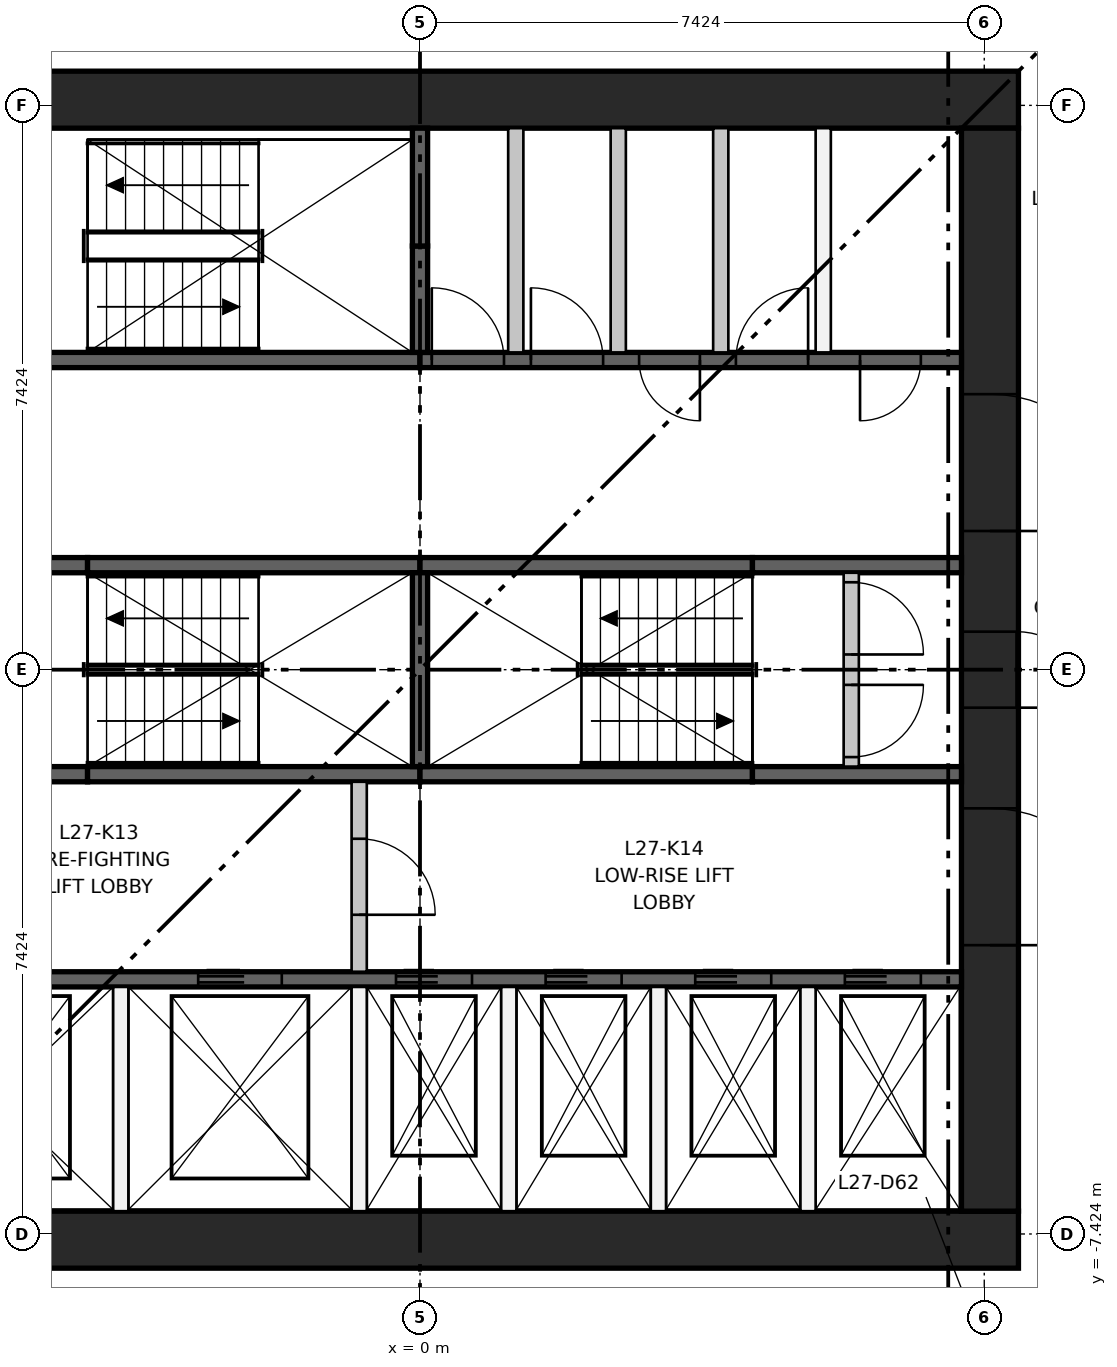
"""IFC4 building model, lengths in metres.
Left out: names, types, materials, properties, quantities, classifications, styles, units other than length and angle.
Written with IfcOpenShell. Run it as: python <this file> out.ifc"""

import sys

from ifc_helpers import new_model, si_unit, direction, frame, frame_2d, origin, place, context, subcontext, project, spatial, rectangle, extrude, element, fill, save


model = new_model("IFC4")
c1 = context("Model", 3, precision=1e-05, world=origin(), true_north=direction((0.0, 1.0)))
c2 = subcontext(c1, "Body", "Model", "MODEL_VIEW")
j1 = project(units=[si_unit("LENGTHUNIT", "METRE"), si_unit("PLANEANGLEUNIT", "RADIAN")], contexts=[c1])
p1 = place(None, origin())
s1 = spatial("IfcSite", under=j1, at=p1, CompositionType="ELEMENT")
p2 = place(p1, origin())
s2 = spatial("IfcBuilding", under=s1, at=p2, CompositionType="ELEMENT")
p3 = place(p2, frame((0.0, 0.0, 105.6)))
s3 = spatial("IfcBuildingStorey", under=s2, at=p3, CompositionType="ELEMENT", Elevation=105.6)
for number, where, z_axis, x_axis in (
    (1, (-7.874, -7.499, 0.0), (0.0, 0.0, 1.0), (1.0, 0.0, 0.0)),
    (2, (-7.874, 7.499, 0.0), (0.0, 0.0, 1.0), (1.0, 0.0, 0.0)),
):
    element("IfcWall", number, at=place(p3, frame(where, z_axis=z_axis, x_axis=x_axis)), inside=s3, PredefinedType="SHEAR", context=c2, shape_type="SweptSolid", body=[
        extrude(rectangle(XDim=15.748, YDim=0.75, at=frame_2d((7.874, 0.0))), origin(), (0.0, 0.0, 1.0), 3.65),
    ])
p4 = place(p3, frame((7.499, -7.124, 0.0), z_axis=(0.0, 0.0, 1.0), x_axis=(0.0, 1.0, 0.0)))
e3 = element("IfcWall", 3, at=p4, inside=s3, PredefinedType="SHEAR", context=c2, shape_type="SweptSolid", body=[
    extrude(rectangle(XDim=14.248, YDim=0.75, at=frame_2d((7.124, 0.0))), origin(), (0.0, 0.0, 1.0), 3.65),
])
p5 = place(p4, frame((6.624, 0.0, 0.0)))
e4 = element("IfcOpeningElement", 4, at=p5, cuts=e3, PredefinedType="OPENING", context=c2, shape_type="SweptSolid", body=[
    extrude(rectangle(XDim=1.0, YDim=2.1, at=frame_2d((0.5, 1.05))), frame((0.0, 0.385, 0.0), z_axis=(0.0, -1.0, 0.0), x_axis=(1.0, 0.0, 0.0)), (0.0, 0.0, 1.0), 0.77),
])
p6 = place(p4, frame((3.5, 0.0, 0.0)))
e5 = element("IfcOpeningElement", 5, at=p6, cuts=e3, PredefinedType="OPENING", context=c2, shape_type="SweptSolid", body=[
    extrude(rectangle(XDim=1.8, YDim=2.1, at=frame_2d((0.9, 1.05))), frame((0.0, 0.385, 0.0), z_axis=(0.0, -1.0, 0.0), x_axis=(1.0, 0.0, 0.0)), (0.0, 0.0, 1.0), 0.77),
])
p7 = place(p4, frame((8.948, 0.0, 0.0)))
e6 = element("IfcOpeningElement", 6, at=p7, cuts=e3, PredefinedType="OPENING", context=c2, shape_type="SweptSolid", body=[
    extrude(rectangle(XDim=1.8, YDim=2.1, at=frame_2d((0.9, 1.05))), frame((0.0, 0.385, 0.0), z_axis=(0.0, -1.0, 0.0), x_axis=(1.0, 0.0, 0.0)), (0.0, 0.0, 1.0), 0.77),
])
p8 = place(p3, frame((-7.124, -4.074, 0.0), z_axis=(0.0, 0.0, 1.0), x_axis=(1.0, 0.0, 0.0)))
e7 = element("IfcWall", 7, at=p8, inside=s3, PredefinedType="SHEAR", context=c2, shape_type="SweptSolid", body=[
    extrude(rectangle(XDim=14.248, YDim=0.2, at=frame_2d((7.124, 0.0))), origin(), (0.0, 0.0, 1.0), 3.3),
])
p9 = place(p8, frame((1.069, 0.0, 0.0)))
e8 = element("IfcOpeningElement", 8, at=p9, cuts=e7, PredefinedType="OPENING", context=c2, shape_type="SweptSolid", body=[
    extrude(rectangle(XDim=1.1, YDim=2.1, at=frame_2d((0.55, 1.05))), frame((0.0, 0.11, 0.0), z_axis=(0.0, -1.0, 0.0), x_axis=(1.0, 0.0, 0.0)), (0.0, 0.0, 1.0), 0.22),
])
p10 = place(p8, frame((4.206, 0.0, 0.0)))
e9 = element("IfcOpeningElement", 9, at=p10, cuts=e7, PredefinedType="OPENING", context=c2, shape_type="SweptSolid", body=[
    extrude(rectangle(XDim=1.1, YDim=2.1, at=frame_2d((0.55, 1.05))), frame((0.0, 0.11, 0.0), z_axis=(0.0, -1.0, 0.0), x_axis=(1.0, 0.0, 0.0)), (0.0, 0.0, 1.0), 0.22),
])
p11 = place(p8, frame((6.808, 0.0, 0.0)))
e10 = element("IfcOpeningElement", 10, at=p11, cuts=e7, PredefinedType="OPENING", context=c2, shape_type="SweptSolid", body=[
    extrude(rectangle(XDim=1.0, YDim=2.1, at=frame_2d((0.5, 1.05))), frame((0.0, 0.11, 0.0), z_axis=(0.0, -1.0, 0.0), x_axis=(1.0, 0.0, 0.0)), (0.0, 0.0, 1.0), 0.22),
])
p12 = place(p8, frame((8.777, 0.0, 0.0)))
e11 = element("IfcOpeningElement", 11, at=p12, cuts=e7, PredefinedType="OPENING", context=c2, shape_type="SweptSolid", body=[
    extrude(rectangle(XDim=1.0, YDim=2.1, at=frame_2d((0.5, 1.05))), frame((0.0, 0.11, 0.0), z_axis=(0.0, -1.0, 0.0), x_axis=(1.0, 0.0, 0.0)), (0.0, 0.0, 1.0), 0.22),
])
p13 = place(p8, frame((10.745, 0.0, 0.0)))
e12 = element("IfcOpeningElement", 12, at=p13, cuts=e7, PredefinedType="OPENING", context=c2, shape_type="SweptSolid", body=[
    extrude(rectangle(XDim=1.0, YDim=2.1, at=frame_2d((0.5, 1.05))), frame((0.0, 0.11, 0.0), z_axis=(0.0, -1.0, 0.0), x_axis=(1.0, 0.0, 0.0)), (0.0, 0.0, 1.0), 0.22),
])
p14 = place(p8, frame((12.714, 0.0, 0.0)))
e13 = element("IfcOpeningElement", 13, at=p14, cuts=e7, PredefinedType="OPENING", context=c2, shape_type="SweptSolid", body=[
    extrude(rectangle(XDim=1.0, YDim=2.1, at=frame_2d((0.5, 1.05))), frame((0.0, 0.11, 0.0), z_axis=(0.0, -1.0, 0.0), x_axis=(1.0, 0.0, 0.0)), (0.0, 0.0, 1.0), 0.22),
])
p15 = place(p3, frame((-7.124, 4.074, 0.0), z_axis=(0.0, 0.0, 1.0), x_axis=(1.0, 0.0, 0.0)))
e14 = element("IfcWall", 14, at=p15, inside=s3, PredefinedType="SHEAR", context=c2, shape_type="SweptSolid", body=[
    extrude(rectangle(XDim=7.124, YDim=0.2, at=frame_2d((3.562, 0.0))), origin(), (0.0, 0.0, 1.0), 3.3),
])
p16 = place(p3, frame((0.0, 4.074, 0.0), z_axis=(0.0, 0.0, 1.0), x_axis=(1.0, 0.0, 0.0)))
e15 = element("IfcWall", 15, at=p16, inside=s3, PredefinedType="SHEAR", context=c2, shape_type="SweptSolid", body=[
    extrude(rectangle(XDim=7.124, YDim=0.2, at=frame_2d((3.562, 0.0))), origin(), (0.0, 0.0, 1.0), 3.3),
])
p17 = place(p16, frame((0.155, 0.0, 0.0)))
e16 = element("IfcOpeningElement", 16, at=p17, cuts=e15, PredefinedType="OPENING", context=c2, shape_type="SweptSolid", body=[
    extrude(rectangle(XDim=0.95, YDim=2.1, at=frame_2d((0.475, 1.05))), frame((0.0, 0.11, 0.0), z_axis=(0.0, -1.0, 0.0), x_axis=(1.0, 0.0, 0.0)), (0.0, 0.0, 1.0), 0.22),
])
p18 = place(p16, frame((1.459, 0.0, 0.0)))
e17 = element("IfcOpeningElement", 17, at=p18, cuts=e15, PredefinedType="OPENING", context=c2, shape_type="SweptSolid", body=[
    extrude(rectangle(XDim=0.95, YDim=2.1, at=frame_2d((0.475, 1.05))), frame((0.0, 0.11, 0.0), z_axis=(0.0, -1.0, 0.0), x_axis=(1.0, 0.0, 0.0)), (0.0, 0.0, 1.0), 0.22),
])
p19 = place(p16, frame((2.883, 0.0, 0.0)))
e18 = element("IfcOpeningElement", 18, at=p19, cuts=e15, PredefinedType="OPENING", context=c2, shape_type="SweptSolid", body=[
    extrude(rectangle(XDim=0.8, YDim=2.1, at=frame_2d((0.4, 1.05))), frame((0.0, 0.11, 0.0), z_axis=(0.0, -1.0, 0.0), x_axis=(1.0, 0.0, 0.0)), (0.0, 0.0, 1.0), 0.22),
])
p20 = place(p16, frame((4.156, 0.0, 0.0)))
e19 = element("IfcOpeningElement", 19, at=p20, cuts=e15, PredefinedType="OPENING", context=c2, shape_type="SweptSolid", body=[
    extrude(rectangle(XDim=0.95, YDim=2.1, at=frame_2d((0.475, 1.05))), frame((0.0, 0.11, 0.0), z_axis=(0.0, -1.0, 0.0), x_axis=(1.0, 0.0, 0.0)), (0.0, 0.0, 1.0), 0.22),
])
p21 = place(p16, frame((5.79, 0.0, 0.0)))
e20 = element("IfcOpeningElement", 20, at=p21, cuts=e15, PredefinedType="OPENING", context=c2, shape_type="SweptSolid", body=[
    extrude(rectangle(XDim=0.8, YDim=2.1, at=frame_2d((0.4, 1.05))), frame((0.0, 0.11, 0.0), z_axis=(0.0, -1.0, 0.0), x_axis=(1.0, 0.0, 0.0)), (0.0, 0.0, 1.0), 0.22),
])
p22 = place(p3, frame((-7.124, -1.375, 0.0), z_axis=(0.0, 0.0, 1.0), x_axis=(1.0, 0.0, 0.0)))
e21 = element("IfcWall", 21, at=p22, inside=s3, PredefinedType="SHEAR", context=c2, shape_type="SweptSolid", body=[
    extrude(rectangle(XDim=2.75, YDim=0.2, at=frame_2d((1.375, 0.0))), origin(), (0.0, 0.0, 1.0), 3.3),
])
for number, where, z_axis, x_axis in (
    (22, (-4.374, -1.375, 0.0), (0.0, 0.0, 1.0), (1.0, 0.0, 0.0)),
    (23, (0.0, -1.375, 0.0), (0.0, 0.0, 1.0), (1.0, 0.0, 0.0)),
):
    element("IfcWall", number, at=place(p3, frame(where, z_axis=z_axis, x_axis=x_axis)), inside=s3, PredefinedType="SHEAR", context=c2, shape_type="SweptSolid", body=[
        extrude(rectangle(XDim=4.374, YDim=0.2, at=frame_2d((2.187, 0.0))), origin(), (0.0, 0.0, 1.0), 3.3),
    ])
for number, where, z_axis, x_axis in (
    (24, (4.374, -1.375, 0.0), (0.0, 0.0, 1.0), (1.0, 0.0, 0.0)),
    (25, (-7.124, 1.375, 0.0), (0.0, 0.0, 1.0), (1.0, 0.0, 0.0)),
):
    element("IfcWall", number, at=place(p3, frame(where, z_axis=z_axis, x_axis=x_axis)), inside=s3, PredefinedType="SHEAR", context=c2, shape_type="SweptSolid", body=[
        extrude(rectangle(XDim=2.75, YDim=0.2, at=frame_2d((1.375, 0.0))), origin(), (0.0, 0.0, 1.0), 3.3),
    ])
for number, where, z_axis, x_axis in (
    (26, (-4.374, 1.375, 0.0), (0.0, 0.0, 1.0), (1.0, 0.0, 0.0)),
    (27, (0.0, 1.375, 0.0), (0.0, 0.0, 1.0), (1.0, 0.0, 0.0)),
):
    element("IfcWall", number, at=place(p3, frame(where, z_axis=z_axis, x_axis=x_axis)), inside=s3, PredefinedType="SHEAR", context=c2, shape_type="SweptSolid", body=[
        extrude(rectangle(XDim=4.374, YDim=0.2, at=frame_2d((2.187, 0.0))), origin(), (0.0, 0.0, 1.0), 3.3),
    ])
p23 = place(p3, frame((4.374, 1.375, 0.0), z_axis=(0.0, 0.0, 1.0), x_axis=(1.0, 0.0, 0.0)))
e28 = element("IfcWall", 28, at=p23, inside=s3, PredefinedType="SHEAR", context=c2, shape_type="SweptSolid", body=[
    extrude(rectangle(XDim=2.75, YDim=0.2, at=frame_2d((1.375, 0.0))), origin(), (0.0, 0.0, 1.0), 3.3),
])
p24 = place(p3, frame((0.0, -1.275, 0.0), z_axis=(0.0, 0.0, 1.0), x_axis=(0.0, 1.0, 0.0)))
e29 = element("IfcWall", 29, at=p24, inside=s3, PredefinedType="SHEAR", context=c2, shape_type="SweptSolid", body=[
    extrude(rectangle(XDim=2.55, YDim=0.2, at=frame_2d((1.275, 0.0))), origin(), (0.0, 0.0, 1.0), 3.3),
])
for number, where, z_axis, x_axis in (
    (30, (-3.937, -7.124, 0.0), (0.0, 0.0, 1.0), (0.0, 1.0, 0.0)),
    (31, (-0.8, -7.124, 0.0), (0.0, 0.0, 1.0), (0.0, 1.0, 0.0)),
):
    element("IfcWall", number, at=place(p3, frame(where, z_axis=z_axis, x_axis=x_axis)), inside=s3, PredefinedType="PARTITIONING", context=c2, shape_type="SweptSolid", body=[
        extrude(rectangle(XDim=2.95, YDim=0.2, at=frame_2d((1.475, 0.0))), origin(), (0.0, 0.0, 1.0), 3.3),
    ])
p25 = place(p3, frame((-0.8, -3.974, 0.0), z_axis=(0.0, 0.0, 1.0), x_axis=(0.0, 1.0, 0.0)))
e32 = element("IfcWall", 32, at=p25, inside=s3, PredefinedType="PARTITIONING", context=c2, shape_type="SweptSolid", body=[
    extrude(rectangle(XDim=2.499, YDim=0.2, at=frame_2d((1.25, 0.0))), origin(), (0.0, 0.0, 1.0), 3.3),
])
p26 = place(p25, frame((0.75, 0.0, 0.0)))
e33 = element("IfcOpeningElement", 33, at=p26, cuts=e32, PredefinedType="OPENING", context=c2, shape_type="SweptSolid", body=[
    extrude(rectangle(XDim=1.0, YDim=2.1, at=frame_2d((0.5, 1.05))), frame((0.0, 0.11, 0.0), z_axis=(0.0, -1.0, 0.0), x_axis=(1.0, 0.0, 0.0)), (0.0, 0.0, 1.0), 0.22),
])
for number, where, z_axis, x_axis in (
    (34, (1.168, -7.124, 0.0), (0.0, 0.0, 1.0), (0.0, 1.0, 0.0)),
    (35, (3.137, -7.124, 0.0), (0.0, 0.0, 1.0), (0.0, 1.0, 0.0)),
    (36, (5.105, -7.124, 0.0), (0.0, 0.0, 1.0), (0.0, 1.0, 0.0)),
):
    element("IfcWall", number, at=place(p3, frame(where, z_axis=z_axis, x_axis=x_axis)), inside=s3, PredefinedType="PARTITIONING", context=c2, shape_type="SweptSolid", body=[
        extrude(rectangle(XDim=2.95, YDim=0.2, at=frame_2d((1.475, 0.0))), origin(), (0.0, 0.0, 1.0), 3.3),
    ])
p27 = place(p3, frame((0.0, 4.174, 0.0), z_axis=(0.0, 0.0, 1.0), x_axis=(0.0, 1.0, 0.0)))
e37 = element("IfcWall", 37, at=p27, inside=s3, PredefinedType="SHEAR", context=c2, shape_type="SweptSolid", body=[
    extrude(rectangle(XDim=1.4, YDim=0.2, at=frame_2d((0.7, 0.0))), origin(), (0.0, 0.0, 1.0), 3.3),
])
p28 = place(p3, frame((0.0, 5.574, 0.0), z_axis=(0.0, 0.0, 1.0), x_axis=(0.0, 1.0, 0.0)))
e38 = element("IfcWall", 38, at=p28, inside=s3, PredefinedType="SHEAR", context=c2, shape_type="SweptSolid", body=[
    extrude(rectangle(XDim=1.55, YDim=0.2, at=frame_2d((0.775, 0.0))), origin(), (0.0, 0.0, 1.0), 3.3),
])
for number, where, z_axis, x_axis in (
    (39, (1.26, 4.174, 0.0), (0.0, 0.0, 1.0), (0.0, 1.0, 0.0)),
    (40, (2.609, 4.174, 0.0), (0.0, 0.0, 1.0), (0.0, 1.0, 0.0)),
    (41, (3.957, 4.174, 0.0), (0.0, 0.0, 1.0), (0.0, 1.0, 0.0)),
    (42, (5.305, 4.174, 0.0), (0.0, 0.0, 1.0), (0.0, 1.0, 0.0)),
):
    element("IfcWall", number, at=place(p3, frame(where, z_axis=z_axis, x_axis=x_axis)), inside=s3, PredefinedType="PARTITIONING", context=c2, shape_type="SweptSolid", body=[
        extrude(rectangle(XDim=2.95, YDim=0.2, at=frame_2d((1.475, 0.0))), origin(), (0.0, 0.0, 1.0), 3.3),
    ])
p29 = place(p3, frame((5.674, -1.275, 0.0), z_axis=(0.0, 0.0, 1.0), x_axis=(0.0, 1.0, 0.0)))
e43 = element("IfcWall", 43, at=p29, inside=s3, PredefinedType="PARTITIONING", context=c2, shape_type="SweptSolid", body=[
    extrude(rectangle(XDim=2.55, YDim=0.2, at=frame_2d((1.275, 0.0))), origin(), (0.0, 0.0, 1.0), 3.3),
])
p30 = place(p29, frame((0.125, 0.0, 0.0)))
e44 = element("IfcOpeningElement", 44, at=p30, cuts=e43, PredefinedType="OPENING", context=c2, shape_type="SweptSolid", body=[
    extrude(rectangle(XDim=0.95, YDim=2.1, at=frame_2d((0.475, 1.05))), frame((0.0, 0.11, 0.0), z_axis=(0.0, -1.0, 0.0), x_axis=(1.0, 0.0, 0.0)), (0.0, 0.0, 1.0), 0.22),
])
p31 = place(p29, frame((1.475, 0.0, 0.0)))
e45 = element("IfcOpeningElement", 45, at=p31, cuts=e43, PredefinedType="OPENING", context=c2, shape_type="SweptSolid", body=[
    extrude(rectangle(XDim=0.95, YDim=2.1, at=frame_2d((0.475, 1.05))), frame((0.0, 0.11, 0.0), z_axis=(0.0, -1.0, 0.0), x_axis=(1.0, 0.0, 0.0)), (0.0, 0.0, 1.0), 0.22),
])
p32 = place(p10, origin())
e46 = element("IfcDoor", 46, at=p32, inside=s3, OperationType="DOUBLE_DOOR_SLIDING", PredefinedType="DOOR", context=c2, shape_type="SweptSolid", body=[
    extrude(rectangle(XDim=1.1, YDim=2.1, at=frame_2d((0.55, 1.05))), frame((0.0, 0.025, 0.0), z_axis=(0.0, -1.0, 0.0), x_axis=(1.0, 0.0, 0.0)), (0.0, 0.0, 1.0), 0.05),
])
fill(e9, e46)
p33 = place(p11, origin())
e47 = element("IfcDoor", 47, at=p33, inside=s3, OperationType="DOUBLE_DOOR_SLIDING", PredefinedType="DOOR", context=c2, shape_type="SweptSolid", body=[
    extrude(rectangle(XDim=1.0, YDim=2.1, at=frame_2d((0.5, 1.05))), frame((0.0, 0.025, 0.0), z_axis=(0.0, -1.0, 0.0), x_axis=(1.0, 0.0, 0.0)), (0.0, 0.0, 1.0), 0.05),
])
fill(e10, e47)
p34 = place(p12, origin())
e48 = element("IfcDoor", 48, at=p34, inside=s3, OperationType="DOUBLE_DOOR_SLIDING", PredefinedType="DOOR", context=c2, shape_type="SweptSolid", body=[
    extrude(rectangle(XDim=1.0, YDim=2.1, at=frame_2d((0.5, 1.05))), frame((0.0, 0.025, 0.0), z_axis=(0.0, -1.0, 0.0), x_axis=(1.0, 0.0, 0.0)), (0.0, 0.0, 1.0), 0.05),
])
fill(e11, e48)
p35 = place(p13, origin())
e49 = element("IfcDoor", 49, at=p35, inside=s3, OperationType="DOUBLE_DOOR_SLIDING", PredefinedType="DOOR", context=c2, shape_type="SweptSolid", body=[
    extrude(rectangle(XDim=1.0, YDim=2.1, at=frame_2d((0.5, 1.05))), frame((0.0, 0.025, 0.0), z_axis=(0.0, -1.0, 0.0), x_axis=(1.0, 0.0, 0.0)), (0.0, 0.0, 1.0), 0.05),
])
fill(e12, e49)
p36 = place(p14, origin())
e50 = element("IfcDoor", 50, at=p36, inside=s3, OperationType="DOUBLE_DOOR_SLIDING", PredefinedType="DOOR", context=c2, shape_type="SweptSolid", body=[
    extrude(rectangle(XDim=1.0, YDim=2.1, at=frame_2d((0.5, 1.05))), frame((0.0, 0.025, 0.0), z_axis=(0.0, -1.0, 0.0), x_axis=(1.0, 0.0, 0.0)), (0.0, 0.0, 1.0), 0.05),
])
fill(e13, e50)
p37 = place(p30, frame((0.95, 0.0, 0.0), z_axis=(0.0, 0.0, 1.0), x_axis=(-1.0, 0.0, 0.0)))
e51 = element("IfcDoor", 51, at=p37, inside=s3, OperationType="SINGLE_SWING_RIGHT", PredefinedType="DOOR", context=c2, shape_type="SweptSolid", body=[
    extrude(rectangle(XDim=0.95, YDim=2.1, at=frame_2d((0.475, 1.05))), frame((0.0, 0.025, 0.0), z_axis=(0.0, -1.0, 0.0), x_axis=(1.0, 0.0, 0.0)), (0.0, 0.0, 1.0), 0.05),
])
fill(e44, e51)
p38 = place(p31, frame((0.95, 0.0, 0.0), z_axis=(0.0, 0.0, 1.0), x_axis=(-1.0, 0.0, 0.0)))
e52 = element("IfcDoor", 52, at=p38, inside=s3, OperationType="SINGLE_SWING_LEFT", PredefinedType="DOOR", context=c2, shape_type="SweptSolid", body=[
    extrude(rectangle(XDim=0.95, YDim=2.1, at=frame_2d((0.475, 1.05))), frame((0.0, 0.025, 0.0), z_axis=(0.0, -1.0, 0.0), x_axis=(1.0, 0.0, 0.0)), (0.0, 0.0, 1.0), 0.05),
])
fill(e45, e52)
p39 = place(p26, frame((1.0, 0.0, 0.0), z_axis=(0.0, 0.0, 1.0), x_axis=(-1.0, 0.0, 0.0)))
e53 = element("IfcDoor", 53, at=p39, inside=s3, OperationType="SINGLE_SWING_LEFT", PredefinedType="DOOR", context=c2, shape_type="SweptSolid", body=[
    extrude(rectangle(XDim=1.0, YDim=2.1, at=frame_2d((0.5, 1.05))), frame((0.0, 0.025, 0.0), z_axis=(0.0, -1.0, 0.0), x_axis=(1.0, 0.0, 0.0)), (0.0, 0.0, 1.0), 0.05),
])
fill(e33, e53)
p40 = place(p17, origin())
e54 = element("IfcDoor", 54, at=p40, inside=s3, OperationType="SINGLE_SWING_LEFT", PredefinedType="DOOR", context=c2, shape_type="SweptSolid", body=[
    extrude(rectangle(XDim=0.95, YDim=2.1, at=frame_2d((0.475, 1.05))), frame((0.0, 0.025, 0.0), z_axis=(0.0, -1.0, 0.0), x_axis=(1.0, 0.0, 0.0)), (0.0, 0.0, 1.0), 0.05),
])
fill(e16, e54)
p41 = place(p18, origin())
e55 = element("IfcDoor", 55, at=p41, inside=s3, OperationType="SINGLE_SWING_LEFT", PredefinedType="DOOR", context=c2, shape_type="SweptSolid", body=[
    extrude(rectangle(XDim=0.95, YDim=2.1, at=frame_2d((0.475, 1.05))), frame((0.0, 0.025, 0.0), z_axis=(0.0, -1.0, 0.0), x_axis=(1.0, 0.0, 0.0)), (0.0, 0.0, 1.0), 0.05),
])
fill(e17, e55)
p42 = place(p19, frame((0.8, 0.0, 0.0), z_axis=(0.0, 0.0, 1.0), x_axis=(-1.0, 0.0, 0.0)))
e56 = element("IfcDoor", 56, at=p42, inside=s3, OperationType="SINGLE_SWING_RIGHT", PredefinedType="DOOR", context=c2, shape_type="SweptSolid", body=[
    extrude(rectangle(XDim=0.8, YDim=2.1, at=frame_2d((0.4, 1.05))), frame((0.0, 0.025, 0.0), z_axis=(0.0, -1.0, 0.0), x_axis=(1.0, 0.0, 0.0)), (0.0, 0.0, 1.0), 0.05),
])
fill(e18, e56)
p43 = place(p20, origin())
e57 = element("IfcDoor", 57, at=p43, inside=s3, OperationType="SINGLE_SWING_RIGHT", PredefinedType="DOOR", context=c2, shape_type="SweptSolid", body=[
    extrude(rectangle(XDim=0.95, YDim=2.1, at=frame_2d((0.475, 1.05))), frame((0.0, 0.025, 0.0), z_axis=(0.0, -1.0, 0.0), x_axis=(1.0, 0.0, 0.0)), (0.0, 0.0, 1.0), 0.05),
])
fill(e19, e57)
p44 = place(p21, frame((0.8, 0.0, 0.0), z_axis=(0.0, 0.0, 1.0), x_axis=(-1.0, 0.0, 0.0)))
e58 = element("IfcDoor", 58, at=p44, inside=s3, OperationType="SINGLE_SWING_LEFT", PredefinedType="DOOR", context=c2, shape_type="SweptSolid", body=[
    extrude(rectangle(XDim=0.8, YDim=2.1, at=frame_2d((0.4, 1.05))), frame((0.0, 0.025, 0.0), z_axis=(0.0, -1.0, 0.0), x_axis=(1.0, 0.0, 0.0)), (0.0, 0.0, 1.0), 0.05),
])
fill(e20, e58)
p45 = place(p5, frame((1.0, 0.0, 0.0), z_axis=(0.0, 0.0, 1.0), x_axis=(-1.0, 0.0, 0.0)))
e59 = element("IfcDoor", 59, at=p45, inside=s3, OperationType="SINGLE_SWING_LEFT", PredefinedType="DOOR", context=c2, shape_type="SweptSolid", body=[
    extrude(rectangle(XDim=1.0, YDim=2.1, at=frame_2d((0.5, 1.05))), frame((0.0, 0.375, 0.0), z_axis=(0.0, -1.0, 0.0), x_axis=(1.0, 0.0, 0.0)), (0.0, 0.0, 1.0), 0.05),
])
fill(e4, e59)
p46 = place(p6, frame((1.8, 0.0, 0.0), z_axis=(0.0, 0.0, 1.0), x_axis=(-1.0, 0.0, 0.0)))
e60 = element("IfcDoor", 60, at=p46, inside=s3, OperationType="DOUBLE_DOOR_SINGLE_SWING", PredefinedType="DOOR", context=c2, shape_type="SweptSolid", body=[
    extrude(rectangle(XDim=1.8, YDim=2.1, at=frame_2d((0.9, 1.05))), frame((0.0, 0.025, 0.0), z_axis=(0.0, -1.0, 0.0), x_axis=(1.0, 0.0, 0.0)), (0.0, 0.0, 1.0), 0.05),
])
fill(e5, e60)
p47 = place(p7, frame((1.8, 0.0, 0.0), z_axis=(0.0, 0.0, 1.0), x_axis=(-1.0, 0.0, 0.0)))
e61 = element("IfcDoor", 61, at=p47, inside=s3, OperationType="DOUBLE_DOOR_SINGLE_SWING", PredefinedType="DOOR", context=c2, shape_type="SweptSolid", body=[
    extrude(rectangle(XDim=1.8, YDim=2.1, at=frame_2d((0.9, 1.05))), frame((0.0, 0.025, 0.0), z_axis=(0.0, -1.0, 0.0), x_axis=(1.0, 0.0, 0.0)), (0.0, 0.0, 1.0), 0.05),
])
fill(e6, e61)
save(model, sys.argv[1])
